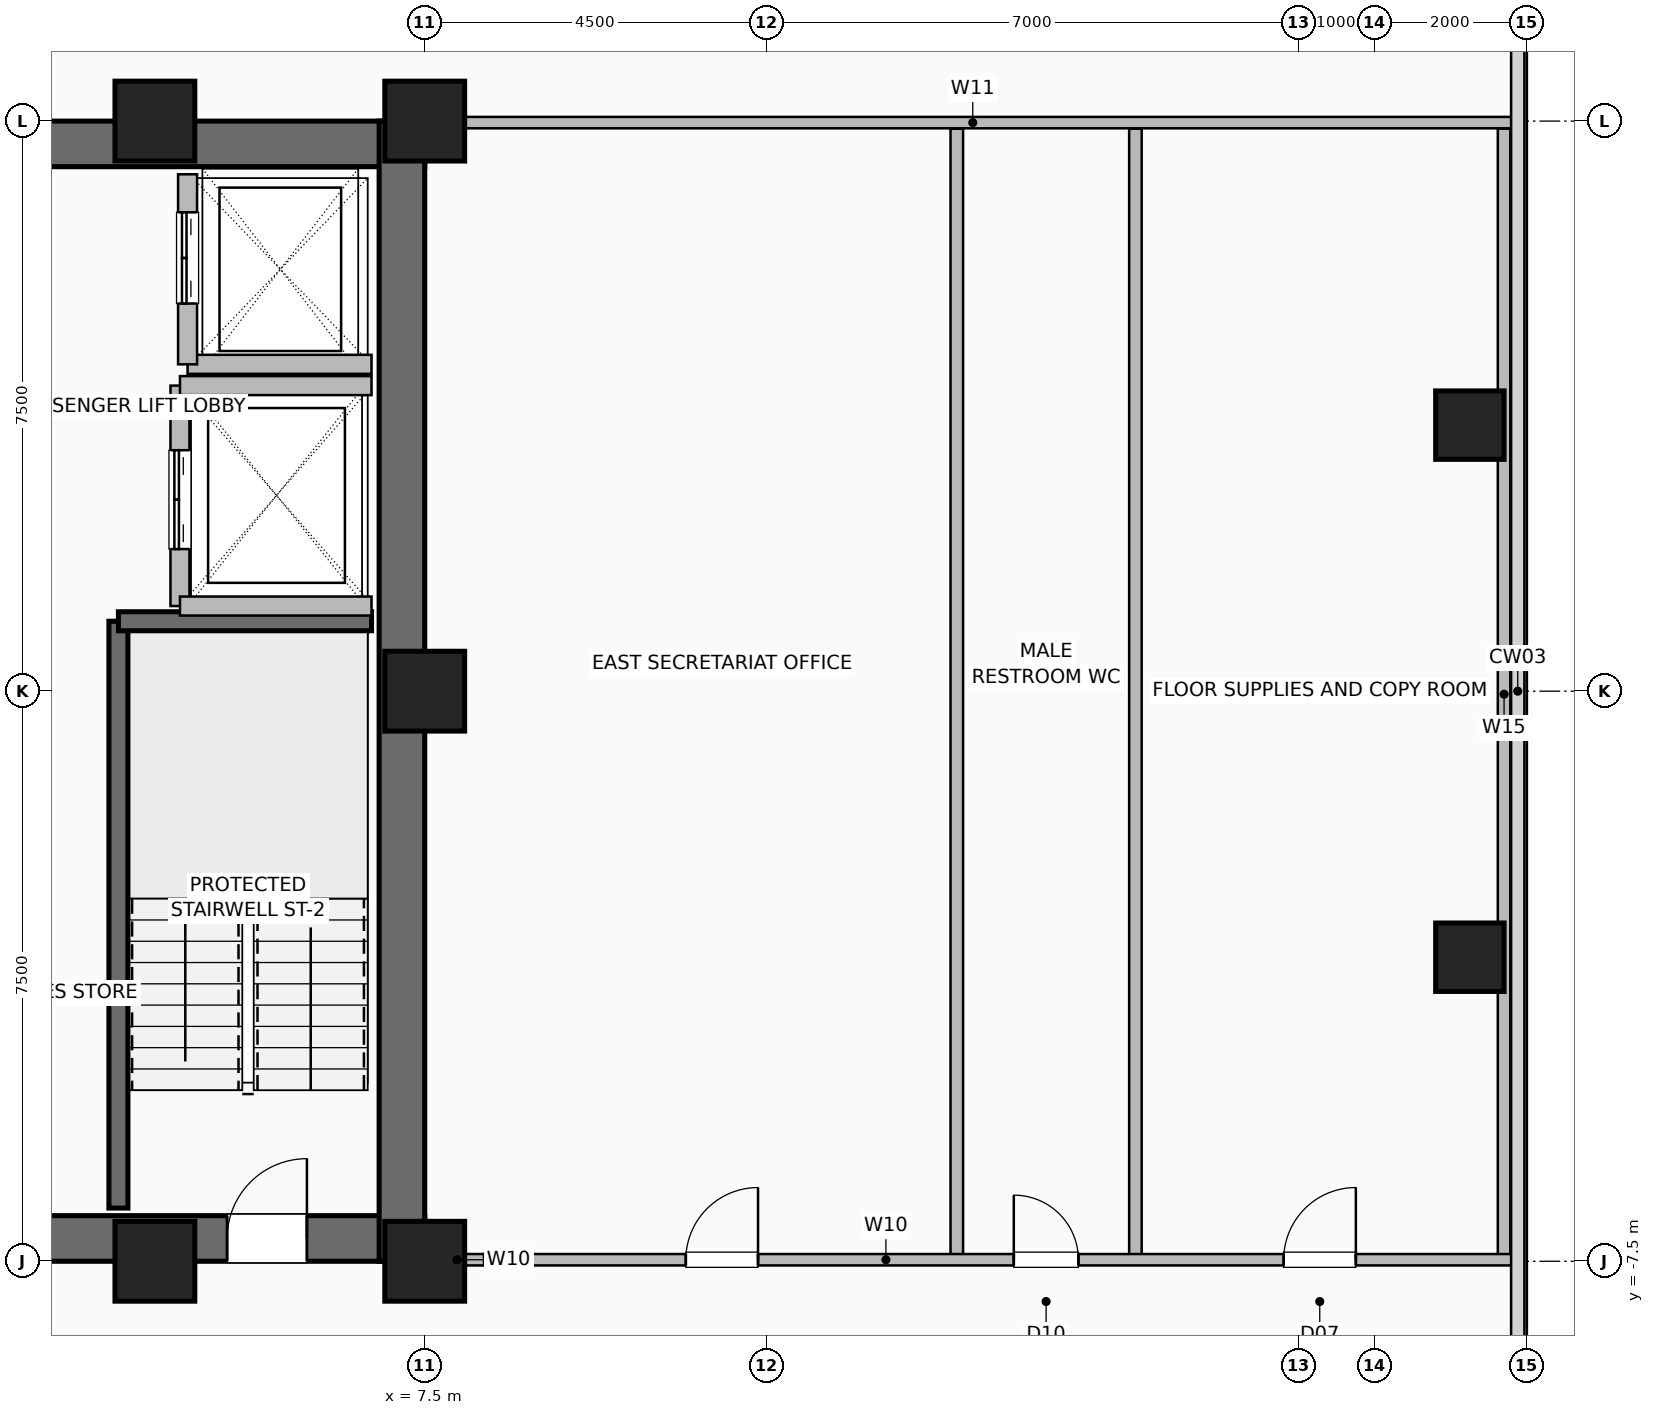
"""IFC4 building model, lengths in metres.
Left out: names, types, materials, properties, quantities, classifications, styles, units other than length and angle.
Written with IfcOpenShell. Run it as: python <this file> out.ifc"""

import sys

from ifc_helpers import new_model, si_unit, direction, frame, frame_2d, origin, origin_2d, place, context, subcontext, project, spatial, rectangle, hollow_rectangle, extrude, element, fill, save


model = new_model("IFC4")
c1 = context("Model", 3, precision=1e-05, world=origin(), true_north=direction((0.0, 1.0)))
c2 = subcontext(c1, "Body", "Model", "MODEL_VIEW")
j1 = project(units=[si_unit("LENGTHUNIT", "METRE"), si_unit("PLANEANGLEUNIT", "RADIAN")], contexts=[c1])
p1 = place(None, origin())
s1 = spatial("IfcSite", under=j1, at=p1, CompositionType="ELEMENT")
p2 = place(p1, origin())
s2 = spatial("IfcBuilding", under=s1, at=p2, CompositionType="ELEMENT")
p3 = place(p2, frame((0.0, 0.0, 108.4)))
s3 = spatial("IfcBuildingStorey", under=s2, at=p3, CompositionType="ELEMENT", Elevation=108.4)
for number, where, z_axis, x_axis in (
    (1, (3.95, -7.5, 0.0), (0.0, 0.0, 1.0), (1.0, 0.0, 0.0)),
    (2, (7.5, -7.5, 0.0), (0.0, 0.0, 1.0), (1.0, 0.0, 0.0)),
    (3, (7.5, 0.0, 0.0), (0.0, 0.0, 1.0), (1.0, 0.0, 0.0)),
    (4, (7.5, 7.5, 0.0), (0.0, 0.0, 1.0), (1.0, 0.0, 0.0)),
    (5, (3.95, 7.5, 0.0), (0.0, 0.0, 1.0), (1.0, 0.0, 0.0)),
):
    element("IfcColumn", number, at=place(p3, frame(where, z_axis=z_axis, x_axis=x_axis)), inside=s3, PredefinedType="COLUMN", context=c2, shape_type="SweptSolid", body=[
        extrude(hollow_rectangle(XDim=1.05, YDim=1.05, WallThickness=0.05, at=origin_2d()), origin(), (0.0, 0.0, 1.0), 3.6),
    ])
for number, where, z_axis, x_axis in (
    (6, (21.25, -3.5, 0.0), (0.0, 0.0, 1.0), (1.0, 0.0, 0.0)),
    (7, (21.25, 3.5, 0.0), (0.0, 0.0, 1.0), (1.0, 0.0, 0.0)),
):
    element("IfcColumn", number, at=place(p3, frame(where, z_axis=z_axis, x_axis=x_axis)), inside=s3, PredefinedType="COLUMN", context=c2, shape_type="SweptSolid", body=[
        extrude(hollow_rectangle(XDim=0.9, YDim=0.9, WallThickness=0.045, at=origin_2d()), origin(), (0.0, 0.0, 1.0), 3.6),
    ])
p4 = place(p3, frame((-7.5, -7.2, 0.0), z_axis=(0.0, 0.0, 1.0), x_axis=(1.0, 0.0, 0.0)))
e8 = element("IfcWall", 8, at=p4, inside=s3, PredefinedType="SHEAR", context=c2, shape_type="SweptSolid", body=[
    extrude(rectangle(XDim=15.0, YDim=0.6, at=frame_2d((7.5, 0.0))), origin(), (0.0, 0.0, 1.0), 3.36),
])
p5 = place(p4, frame((1.55, 0.0, 0.0)))
e9 = element("IfcOpeningElement", 9, at=p5, cuts=e8, PredefinedType="OPENING", context=c2, shape_type="SweptSolid", body=[
    extrude(rectangle(XDim=1.05, YDim=2.08, at=frame_2d((0.525, 1.04))), frame((0.0, 0.31, 0.0), z_axis=(0.0, -1.0, 0.0), x_axis=(1.0, 0.0, 0.0)), (0.0, 0.0, 1.0), 0.62),
])
p6 = place(p4, frame((12.4, 0.0, 0.0)))
e10 = element("IfcOpeningElement", 10, at=p6, cuts=e8, PredefinedType="OPENING", context=c2, shape_type="SweptSolid", body=[
    extrude(rectangle(XDim=1.05, YDim=2.08, at=frame_2d((0.525, 1.04))), frame((0.0, 0.31, 0.0), z_axis=(0.0, -1.0, 0.0), x_axis=(1.0, 0.0, 0.0)), (0.0, 0.0, 1.0), 0.62),
])
p7 = place(p4, frame((5.2, 0.0, 0.0)))
e11 = element("IfcOpeningElement", 11, at=p7, cuts=e8, PredefinedType="OPENING", context=c2, shape_type="SweptSolid", body=[
    extrude(rectangle(XDim=1.0, YDim=2.08, at=frame_2d((0.5, 1.04))), frame((0.0, 0.31, 0.0), z_axis=(0.0, -1.0, 0.0), x_axis=(1.0, 0.0, 0.0)), (0.0, 0.0, 1.0), 0.62),
])
p8 = place(p4, frame((8.65, 0.0, 0.0)))
e12 = element("IfcOpeningElement", 12, at=p8, cuts=e8, PredefinedType="OPENING", context=c2, shape_type="SweptSolid", body=[
    extrude(rectangle(XDim=1.0, YDim=2.08, at=frame_2d((0.5, 1.04))), frame((0.0, 0.31, 0.0), z_axis=(0.0, -1.0, 0.0), x_axis=(1.0, 0.0, 0.0)), (0.0, 0.0, 1.0), 0.62),
])
for number, where, z_axis, x_axis in (
    (13, (-7.5, 7.2, 0.0), (0.0, 0.0, 1.0), (1.0, 0.0, 0.0)),
    (14, (7.2, -7.5, 0.0), (0.0, 0.0, 1.0), (0.0, 1.0, 0.0)),
):
    element("IfcWall", number, at=place(p3, frame(where, z_axis=z_axis, x_axis=x_axis)), inside=s3, PredefinedType="SHEAR", context=c2, shape_type="SweptSolid", body=[
        extrude(rectangle(XDim=15.0, YDim=0.6, at=frame_2d((7.5, 0.0))), origin(), (0.0, 0.0, 1.0), 3.36),
    ])
p9 = place(p3, frame((3.47, -6.8, 0.0), z_axis=(0.0, 0.0, 1.0), x_axis=(0.0, 1.0, 0.0)))
e15 = element("IfcWall", 15, at=p9, inside=s3, PredefinedType="SHEAR", context=c2, shape_type="SweptSolid", body=[
    extrude(rectangle(XDim=7.72, YDim=0.25, at=frame_2d((3.86, 0.0))), origin(), (0.0, 0.0, 1.0), 3.36),
])
p10 = place(p3, frame((3.47, 0.92, 0.0), z_axis=(0.0, 0.0, 1.0), x_axis=(1.0, 0.0, 0.0)))
e16 = element("IfcWall", 16, at=p10, inside=s3, PredefinedType="SHEAR", context=c2, shape_type="SweptSolid", body=[
    extrude(rectangle(XDim=3.33, YDim=0.25, at=frame_2d((1.665, 0.0))), origin(), (0.0, 0.0, 1.0), 3.36),
])
p11 = place(p3, frame((4.38, 4.3, 0.0), z_axis=(0.0, 0.0, 1.0), x_axis=(1.0, 0.0, 0.0)))
e17 = element("IfcWall", 17, at=p11, inside=s3, PredefinedType="SHEAR", context=c2, shape_type="SweptSolid", body=[
    extrude(rectangle(XDim=2.42, YDim=0.25, at=frame_2d((1.21, 0.0))), origin(), (0.0, 0.0, 1.0), 3.36),
])
p12 = place(p3, frame((4.38, 4.3, 0.0), z_axis=(0.0, 0.0, 1.0), x_axis=(0.0, 1.0, 0.0)))
e18 = element("IfcWall", 18, at=p12, inside=s3, PredefinedType="SHEAR", context=c2, shape_type="SweptSolid", body=[
    extrude(rectangle(XDim=2.5, YDim=0.25, at=frame_2d((1.25, 0.0))), origin(), (0.0, 0.0, 1.0), 3.36),
])
p13 = place(p12, frame((0.8, 0.0, 0.0)))
e19 = element("IfcOpeningElement", 19, at=p13, cuts=e18, PredefinedType="OPENING", context=c2, shape_type="SweptSolid", body=[
    extrude(rectangle(XDim=1.2, YDim=2.2, at=frame_2d((0.6, 1.1))), frame((0.0, 0.135, 0.0), z_axis=(0.0, -1.0, 0.0), x_axis=(1.0, 0.0, 0.0)), (0.0, 0.0, 1.0), 0.27),
])
p14 = place(p3, frame((4.28, 1.12, 0.0), z_axis=(0.0, 0.0, 1.0), x_axis=(0.0, 1.0, 0.0)))
e20 = element("IfcWall", 20, at=p14, inside=s3, PredefinedType="SHEAR", context=c2, shape_type="SweptSolid", body=[
    extrude(rectangle(XDim=2.9, YDim=0.25, at=frame_2d((1.45, 0.0))), origin(), (0.0, 0.0, 1.0), 3.36),
])
p15 = place(p14, frame((0.75, 0.0, 0.0)))
e21 = element("IfcOpeningElement", 21, at=p15, cuts=e20, PredefinedType="OPENING", context=c2, shape_type="SweptSolid", body=[
    extrude(rectangle(XDim=1.3, YDim=2.3, at=frame_2d((0.65, 1.15))), frame((0.0, 0.135, 0.0), z_axis=(0.0, -1.0, 0.0), x_axis=(1.0, 0.0, 0.0)), (0.0, 0.0, 1.0), 0.27),
])
for number, where, z_axis, x_axis in (
    (22, (4.28, 1.12, 0.0), (0.0, 0.0, 1.0), (1.0, 0.0, 0.0)),
    (23, (4.28, 4.02, 0.0), (0.0, 0.0, 1.0), (1.0, 0.0, 0.0)),
):
    element("IfcWall", number, at=place(p3, frame(where, z_axis=z_axis, x_axis=x_axis)), inside=s3, PredefinedType="SHEAR", context=c2, shape_type="SweptSolid", body=[
        extrude(rectangle(XDim=2.52, YDim=0.25, at=frame_2d((1.26, 0.0))), origin(), (0.0, 0.0, 1.0), 3.36),
    ])
p16 = place(p3, frame((7.45, -7.48, 0.0), z_axis=(0.0, 0.0, 1.0), x_axis=(1.0, 0.0, 0.0)))
e24 = element("IfcWall", 24, at=p16, inside=s3, PredefinedType="PARTITIONING", context=c2, shape_type="SweptSolid", body=[
    extrude(rectangle(XDim=0.95, YDim=0.15, at=frame_2d((0.475, 0.0))), origin(), (0.0, 0.0, 1.0), 3.36),
])
for number, where, z_axis, x_axis in (
    (25, (16.85, -7.48, 0.0), (0.0, 0.0, 1.0), (0.0, 1.0, 0.0)),
    (26, (14.5, -7.48, 0.0), (0.0, 0.0, 1.0), (0.0, 1.0, 0.0)),
    (27, (21.7, -7.48, 0.0), (0.0, 0.0, 1.0), (0.0, 1.0, 0.0)),
):
    element("IfcWall", number, at=place(p3, frame(where, z_axis=z_axis, x_axis=x_axis)), inside=s3, PredefinedType="PLUMBINGWALL", context=c2, shape_type="SweptSolid", body=[
        extrude(rectangle(XDim=14.88, YDim=0.165, at=frame_2d((7.44, 0.0))), origin(), (0.0, 0.0, 1.0), 3.36),
    ])
p17 = place(p3, frame((8.28, -7.48, 0.0), z_axis=(0.0, 0.0, 1.0), x_axis=(1.0, 0.0, 0.0)))
e28 = element("IfcWall", 28, at=p17, inside=s3, PredefinedType="PARTITIONING", context=c2, shape_type="SweptSolid", body=[
    extrude(rectangle(XDim=13.54, YDim=0.15, at=frame_2d((6.77, 0.0))), origin(), (0.0, 0.0, 1.0), 3.36),
])
p18 = place(p17, frame((2.655, 0.0, 0.0)))
e29 = element("IfcOpeningElement", 29, at=p18, cuts=e28, PredefinedType="OPENING", context=c2, shape_type="SweptSolid", body=[
    extrude(rectangle(XDim=0.95, YDim=2.06, at=frame_2d((0.475, 1.03))), frame((0.0, 0.085, 0.0), z_axis=(0.0, -1.0, 0.0), x_axis=(1.0, 0.0, 0.0)), (0.0, 0.0, 1.0), 0.17),
])
p19 = place(p17, frame((6.97, 0.0, 0.0)))
e30 = element("IfcOpeningElement", 30, at=p19, cuts=e28, PredefinedType="OPENING", context=c2, shape_type="SweptSolid", body=[
    extrude(rectangle(XDim=0.85, YDim=2.05, at=frame_2d((0.425, 1.025))), frame((0.0, 0.085, 0.0), z_axis=(0.0, -1.0, 0.0), x_axis=(1.0, 0.0, 0.0)), (0.0, 0.0, 1.0), 0.17),
])
p20 = place(p17, frame((10.52, 0.0, 0.0)))
e31 = element("IfcOpeningElement", 31, at=p20, cuts=e28, PredefinedType="OPENING", context=c2, shape_type="SweptSolid", body=[
    extrude(rectangle(XDim=0.95, YDim=2.06, at=frame_2d((0.475, 1.03))), frame((0.0, 0.085, 0.0), z_axis=(0.0, -1.0, 0.0), x_axis=(1.0, 0.0, 0.0)), (0.0, 0.0, 1.0), 0.17),
])
p21 = place(p3, frame((7.6, 7.48, 0.0), z_axis=(0.0, 0.0, 1.0), x_axis=(1.0, 0.0, 0.0)))
e32 = element("IfcWall", 32, at=p21, inside=s3, PredefinedType="PARTITIONING", context=c2, shape_type="SweptSolid", body=[
    extrude(rectangle(XDim=14.22, YDim=0.15, at=frame_2d((7.11, 0.0))), origin(), (0.0, 0.0, 1.0), 3.36),
])
p22 = place(p6, origin())
e33 = element("IfcDoor", 33, at=p22, inside=s3, OperationType="SINGLE_SWING_RIGHT", PredefinedType="DOOR", context=c2, shape_type="SweptSolid", body=[
    extrude(rectangle(XDim=1.05, YDim=2.08, at=frame_2d((0.525, 1.04))), frame((0.0, 0.025, 0.0), z_axis=(0.0, -1.0, 0.0), x_axis=(1.0, 0.0, 0.0)), (0.0, 0.0, 1.0), 0.05),
])
fill(e10, e33)
p23 = place(p13, origin())
e34 = element("IfcDoor", 34, at=p23, inside=s3, OperationType="DOUBLE_DOOR_SLIDING", PredefinedType="DOOR", context=c2, shape_type="SweptSolid", body=[
    extrude(rectangle(XDim=1.2, YDim=2.2, at=frame_2d((0.6, 1.1))), frame((0.0, 0.025, 0.0), z_axis=(0.0, -1.0, 0.0), x_axis=(1.0, 0.0, 0.0)), (0.0, 0.0, 1.0), 0.05),
])
fill(e19, e34)
p24 = place(p15, origin())
e35 = element("IfcDoor", 35, at=p24, inside=s3, OperationType="DOUBLE_DOOR_SLIDING", PredefinedType="DOOR", context=c2, shape_type="SweptSolid", body=[
    extrude(rectangle(XDim=1.3, YDim=2.3, at=frame_2d((0.65, 1.15))), frame((0.0, 0.025, 0.0), z_axis=(0.0, -1.0, 0.0), x_axis=(1.0, 0.0, 0.0)), (0.0, 0.0, 1.0), 0.05),
])
fill(e21, e35)
p25 = place(p18, origin())
e36 = element("IfcDoor", 36, at=p25, inside=s3, OperationType="SINGLE_SWING_RIGHT", PredefinedType="DOOR", context=c2, shape_type="SweptSolid", body=[
    extrude(rectangle(XDim=0.95, YDim=2.06, at=frame_2d((0.475, 1.03))), frame((0.0, 0.025, 0.0), z_axis=(0.0, -1.0, 0.0), x_axis=(1.0, 0.0, 0.0)), (0.0, 0.0, 1.0), 0.05),
])
fill(e29, e36)
p26 = place(p19, origin())
e37 = element("IfcDoor", 37, at=p26, inside=s3, OperationType="SINGLE_SWING_LEFT", PredefinedType="DOOR", context=c2, shape_type="SweptSolid", body=[
    extrude(rectangle(XDim=0.85, YDim=2.05, at=frame_2d((0.425, 1.025))), frame((0.0, 0.025, 0.0), z_axis=(0.0, -1.0, 0.0), x_axis=(1.0, 0.0, 0.0)), (0.0, 0.0, 1.0), 0.05),
])
fill(e30, e37)
p27 = place(p20, origin())
e38 = element("IfcDoor", 38, at=p27, inside=s3, OperationType="SINGLE_SWING_RIGHT", PredefinedType="DOOR", context=c2, shape_type="SweptSolid", body=[
    extrude(rectangle(XDim=0.95, YDim=2.06, at=frame_2d((0.475, 1.03))), frame((0.0, 0.025, 0.0), z_axis=(0.0, -1.0, 0.0), x_axis=(1.0, 0.0, 0.0)), (0.0, 0.0, 1.0), 0.05),
])
fill(e31, e38)
save(model, sys.argv[1])
